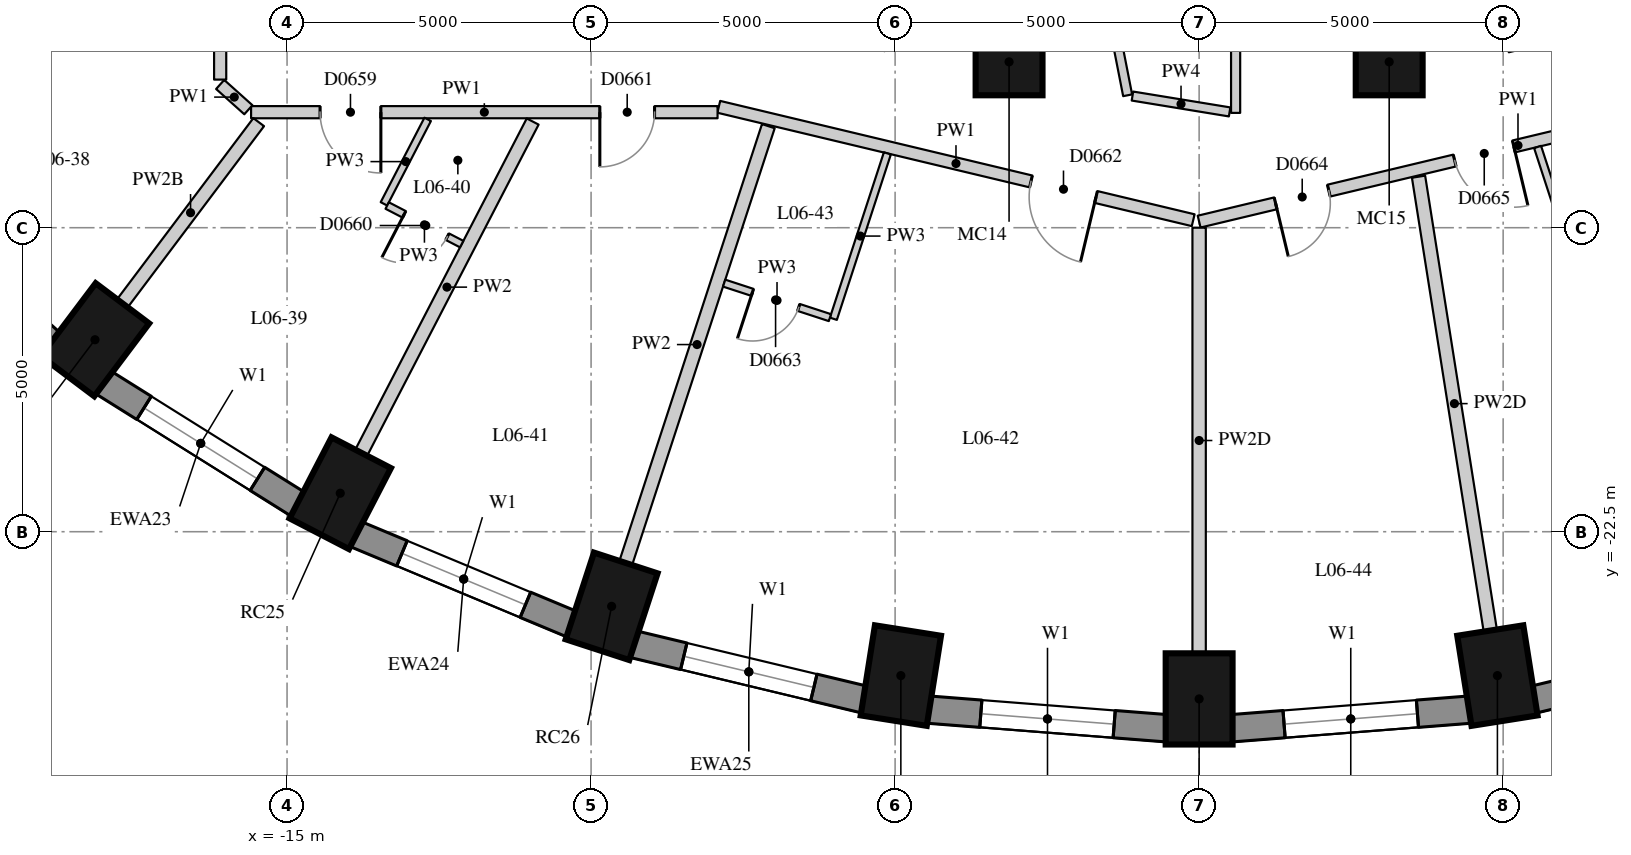
"""IFC4 building model, lengths in metres.
Left out: names, types, materials, properties, quantities, classifications, styles, units other than length and angle.
Written with IfcOpenShell. Run it as: python <this file> out.ifc"""

import sys

from ifc_helpers import new_model, si_unit, direction, frame, frame_2d, origin, origin_2d, place, context, subcontext, project, spatial, rectangle, extrude, element, fill, save


model = new_model("IFC4")
c1 = context("Model", 3, precision=1e-05, world=origin(), true_north=direction((0.0, 1.0)))
c2 = subcontext(c1, "Body", "Model", "MODEL_VIEW")
j1 = project(units=[si_unit("LENGTHUNIT", "METRE"), si_unit("PLANEANGLEUNIT", "RADIAN")], contexts=[c1])
p1 = place(None, origin())
s1 = spatial("IfcSite", under=j1, at=p1, CompositionType="ELEMENT")
p2 = place(p1, origin())
s2 = spatial("IfcBuilding", under=s1, at=p2, CompositionType="ELEMENT")
p3 = place(p2, frame((0.0, 0.0, 28.3)))
s3 = spatial("IfcBuildingStorey", under=s2, at=p3, CompositionType="ELEMENT", Elevation=28.3)
for number, where, z_axis, x_axis in (
    (1, (-18.159, -19.343, 0.0), (0.0, 0.0, 1.0), (-0.601, -0.799, 0.0)),
    (2, (-14.125, -21.867, 0.0), (0.0, 0.0, 1.0), (-0.46, -0.888, 0.0)),
    (3, (-9.662, -23.727, 0.0), (0.0, 0.0, 1.0), (-0.31, -0.951, 0.0)),
    (4, (-4.906, -24.866, 0.0), (0.0, 0.0, 1.0), (-0.156, -0.988, 0.0)),
    (5, (0.0, -25.25, 0.0), (0.0, 0.0, 1.0), (0.0, -1.0, 0.0)),
    (6, (4.906, -24.866, 0.0), (0.0, 0.0, 1.0), (0.156, -0.988, 0.0)),
):
    element("IfcColumn", number, at=place(p3, frame(where, z_axis=z_axis, x_axis=x_axis)), inside=s3, PredefinedType="COLUMN", context=c2, shape_type="SweptSolid", body=[
        extrude(rectangle(XDim=1.5, YDim=1.1, at=origin_2d()), origin(), (0.0, 0.0, 1.0), 3.3),
    ])
for number, where, z_axis, x_axis in (
    (7, (-3.126, -14.772, 0.0), (0.0, 0.0, 1.0), (1.0, 0.0, 0.0)),
    (8, (3.126, -14.772, 0.0), (0.0, 0.0, 1.0), (1.0, 0.0, 0.0)),
):
    element("IfcColumn", number, at=place(p3, frame(where, z_axis=z_axis, x_axis=x_axis)), inside=s3, PredefinedType="COLUMN", context=c2, shape_type="SweptSolid", body=[
        extrude(rectangle(XDim=1.1, YDim=1.1, at=origin_2d()), origin(), (0.0, 0.0, 1.0), 3.3),
    ])
p4 = place(p3, frame((-21.627, -16.943, 0.0), z_axis=(0.0, 0.0, 1.0), x_axis=(0.745526233716, -0.66647628228, 0.0)))
e9 = element("IfcWall", 9, at=p4, inside=s3, PredefinedType="SOLIDWALL", context=c2, shape_type="SweptSolid", body=[
    extrude(rectangle(XDim=3.697, YDim=0.45, at=frame_2d((1.848, 0.0))), origin(), (0.0, 0.0, 1.0), 3.02),
])
p5 = place(p4, frame((0.749, 0.0, 0.4)))
e10 = element("IfcOpeningElement", 10, at=p5, cuts=e9, PredefinedType="OPENING", context=c2, shape_type="SweptSolid", body=[
    extrude(rectangle(XDim=2.2, YDim=1.75, at=frame_2d((1.1, 0.875))), frame((0.0, 0.235, 0.0), z_axis=(0.0, -1.0, 0.0), x_axis=(1.0, 0.0, 0.0)), (0.0, 0.0, 1.0), 0.47),
])
p6 = place(p3, frame((-18.023, -20.044, 0.0), z_axis=(0.0, 0.0, 1.0), x_axis=(0.847635480093, -0.530579016629, 0.0)))
e11 = element("IfcWall", 11, at=p6, inside=s3, PredefinedType="SOLIDWALL", context=c2, shape_type="SweptSolid", body=[
    extrude(rectangle(XDim=3.782, YDim=0.45, at=frame_2d((1.891, 0.0))), origin(), (0.0, 0.0, 1.0), 3.02),
])
p7 = place(p6, frame((0.791, 0.0, 0.4)))
e12 = element("IfcOpeningElement", 12, at=p7, cuts=e11, PredefinedType="OPENING", context=c2, shape_type="SweptSolid", body=[
    extrude(rectangle(XDim=2.2, YDim=1.75, at=frame_2d((1.1, 0.875))), frame((0.0, 0.235, 0.0), z_axis=(0.0, -1.0, 0.0), x_axis=(1.0, 0.0, 0.0)), (0.0, 0.0, 1.0), 0.47),
])
p8 = place(p3, frame((-13.875, -22.537, 0.0), z_axis=(0.0, 0.0, 1.0), x_axis=(0.923031964282, -0.384723267966, 0.0)))
e13 = element("IfcWall", 13, at=p8, inside=s3, PredefinedType="SOLIDWALL", context=c2, shape_type="SweptSolid", body=[
    extrude(rectangle(XDim=3.856, YDim=0.45, at=frame_2d((1.928, 0.0))), origin(), (0.0, 0.0, 1.0), 3.02),
])
p9 = place(p8, frame((0.828, 0.0, 0.4)))
e14 = element("IfcOpeningElement", 14, at=p9, cuts=e13, PredefinedType="OPENING", context=c2, shape_type="SweptSolid", body=[
    extrude(rectangle(XDim=2.2, YDim=1.75, at=frame_2d((1.1, 0.875))), frame((0.0, 0.235, 0.0), z_axis=(0.0, -1.0, 0.0), x_axis=(1.0, 0.0, 0.0)), (0.0, 0.0, 1.0), 0.47),
])
p10 = place(p3, frame((-9.308, -24.35, 0.0), z_axis=(0.0, 0.0, 1.0), x_axis=(0.972496561493, -0.232917233979, 0.0)))
e15 = element("IfcWall", 15, at=p10, inside=s3, PredefinedType="SOLIDWALL", context=c2, shape_type="SweptSolid", body=[
    extrude(rectangle(XDim=3.911, YDim=0.45, at=frame_2d((1.956, 0.0))), origin(), (0.0, 0.0, 1.0), 3.02),
])
p11 = place(p10, frame((0.855, 0.0, 0.4)))
e16 = element("IfcOpeningElement", 16, at=p11, cuts=e15, PredefinedType="OPENING", context=c2, shape_type="SweptSolid", body=[
    extrude(rectangle(XDim=2.2, YDim=1.75, at=frame_2d((1.1, 0.875))), frame((0.0, 0.235, 0.0), z_axis=(0.0, -1.0, 0.0), x_axis=(1.0, 0.0, 0.0)), (0.0, 0.0, 1.0), 0.47),
])
p12 = place(p3, frame((-4.457, -25.426, 0.0), z_axis=(0.0, 0.0, 1.0), x_axis=(0.996955972145, -0.077966592873, 0.0)))
e17 = element("IfcWall", 17, at=p12, inside=s3, PredefinedType="SOLIDWALL", context=c2, shape_type="SweptSolid", body=[
    extrude(rectangle(XDim=3.939, YDim=0.45, at=frame_2d((1.97, 0.0))), origin(), (0.0, 0.0, 1.0), 3.02),
])
p13 = place(p12, frame((0.87, 0.0, 0.4)))
e18 = element("IfcOpeningElement", 18, at=p13, cuts=e17, PredefinedType="OPENING", context=c2, shape_type="SweptSolid", body=[
    extrude(rectangle(XDim=2.2, YDim=1.75, at=frame_2d((1.1, 0.875))), frame((0.0, 0.235, 0.0), z_axis=(0.0, -1.0, 0.0), x_axis=(1.0, 0.0, 0.0)), (0.0, 0.0, 1.0), 0.47),
])
p14 = place(p3, frame((0.53, -25.733, 0.0), z_axis=(0.0, 0.0, 1.0), x_axis=(0.996955972145, 0.077966592873, 0.0)))
e19 = element("IfcWall", 19, at=p14, inside=s3, PredefinedType="SOLIDWALL", context=c2, shape_type="SweptSolid", body=[
    extrude(rectangle(XDim=3.939, YDim=0.45, at=frame_2d((1.97, 0.0))), origin(), (0.0, 0.0, 1.0), 3.02),
])
p15 = place(p14, frame((0.87, 0.0, 0.4)))
e20 = element("IfcOpeningElement", 20, at=p15, cuts=e19, PredefinedType="OPENING", context=c2, shape_type="SweptSolid", body=[
    extrude(rectangle(XDim=2.2, YDim=1.75, at=frame_2d((1.1, 0.875))), frame((0.0, 0.235, 0.0), z_axis=(0.0, -1.0, 0.0), x_axis=(1.0, 0.0, 0.0)), (0.0, 0.0, 1.0), 0.47),
])
p16 = place(p3, frame((5.504, -25.26, 0.0), z_axis=(0.0, 0.0, 1.0), x_axis=(0.972496561493, 0.232917233979, 0.0)))
e21 = element("IfcWall", 21, at=p16, inside=s3, PredefinedType="SOLIDWALL", context=c2, shape_type="SweptSolid", body=[
    extrude(rectangle(XDim=3.911, YDim=0.45, at=frame_2d((1.956, 0.0))), origin(), (0.0, 0.0, 1.0), 3.02),
])
p17 = place(p16, frame((0.855, 0.0, 0.4)))
e22 = element("IfcOpeningElement", 22, at=p17, cuts=e21, PredefinedType="OPENING", context=c2, shape_type="SweptSolid", body=[
    extrude(rectangle(XDim=2.2, YDim=1.75, at=frame_2d((1.1, 0.875))), frame((0.0, 0.235, 0.0), z_axis=(0.0, -1.0, 0.0), x_axis=(1.0, 0.0, 0.0)), (0.0, 0.0, 1.0), 0.47),
])
p18 = place(p3, frame((10.488, -14.893, 0.0), z_axis=(0.0, 0.0, 1.0), x_axis=(-0.972603489924, -0.23247032367, 0.0)))
e23 = element("IfcWall", 23, at=p18, inside=s3, PredefinedType="PARTITIONING", context=c2, shape_type="SweptSolid", body=[
    extrude(rectangle(XDim=10.783, YDim=0.2, at=frame_2d((5.392, 0.0))), origin(), (0.0, 0.0, 1.0), 3.02),
])
p19 = place(p18, frame((8.59, 0.0, 0.0)))
e24 = element("IfcOpeningElement", 24, at=p19, cuts=e23, PredefinedType="OPENING", context=c2, shape_type="SweptSolid", body=[
    extrude(rectangle(XDim=0.9, YDim=2.1, at=frame_2d((0.45, 1.05))), frame((0.0, 0.11, 0.0), z_axis=(0.0, -1.0, 0.0), x_axis=(1.0, 0.0, 0.0)), (0.0, 0.0, 1.0), 0.22),
])
p20 = place(p18, frame((5.462, 0.0, 0.0)))
e25 = element("IfcOpeningElement", 25, at=p20, cuts=e23, PredefinedType="OPENING", context=c2, shape_type="SweptSolid", body=[
    extrude(rectangle(XDim=1.0, YDim=2.1, at=frame_2d((0.5, 1.05))), frame((0.0, 0.11, 0.0), z_axis=(0.0, -1.0, 0.0), x_axis=(1.0, 0.0, 0.0)), (0.0, 0.0, 1.0), 0.22),
])
p21 = place(p3, frame((-0.098, -17.377, 0.0), z_axis=(0.0, 0.0, 1.0), x_axis=(-0.97260043732, 0.232483094708, 0.0)))
e26 = element("IfcWall", 26, at=p21, inside=s3, PredefinedType="PARTITIONING", context=c2, shape_type="SweptSolid", body=[
    extrude(rectangle(XDim=8.022, YDim=0.2, at=frame_2d((4.011, 0.0))), origin(), (0.0, 0.0, 1.0), 3.02),
])
p22 = place(p21, frame((1.643, 0.0, 0.0)))
e27 = element("IfcOpeningElement", 27, at=p22, cuts=e26, PredefinedType="OPENING", context=c2, shape_type="SweptSolid", body=[
    extrude(rectangle(XDim=1.1, YDim=2.1, at=frame_2d((0.55, 1.05))), frame((0.0, 0.11, 0.0), z_axis=(0.0, -1.0, 0.0), x_axis=(1.0, 0.0, 0.0)), (0.0, 0.0, 1.0), 0.22),
])
p23 = place(p3, frame((-7.92, -15.6, 0.0), z_axis=(0.0, 0.0, 1.0), x_axis=(-1.0, 0.0, 0.0)))
e28 = element("IfcWall", 28, at=p23, inside=s3, PredefinedType="PARTITIONING", context=c2, shape_type="SweptSolid", body=[
    extrude(rectangle(XDim=7.672, YDim=0.2, at=frame_2d((3.836, 0.0))), origin(), (0.0, 0.0, 1.0), 3.02),
])
p24 = place(p23, frame((5.537, 0.0, 0.0)))
e29 = element("IfcOpeningElement", 29, at=p24, cuts=e28, PredefinedType="OPENING", context=c2, shape_type="SweptSolid", body=[
    extrude(rectangle(XDim=1.0, YDim=2.1, at=frame_2d((0.5, 1.05))), frame((0.0, 0.11, 0.0), z_axis=(0.0, -1.0, 0.0), x_axis=(1.0, 0.0, 0.0)), (0.0, 0.0, 1.0), 0.22),
])
p25 = place(p23, frame((1.036, 0.0, 0.0)))
e30 = element("IfcOpeningElement", 30, at=p25, cuts=e28, PredefinedType="OPENING", context=c2, shape_type="SweptSolid", body=[
    extrude(rectangle(XDim=0.9, YDim=2.1, at=frame_2d((0.45, 1.05))), frame((0.0, 0.11, 0.0), z_axis=(0.0, -1.0, 0.0), x_axis=(1.0, 0.0, 0.0)), (0.0, 0.0, 1.0), 0.22),
])
p26 = place(p3, frame((-15.636, -15.56, 0.0), z_axis=(0.0, 0.0, 1.0), x_axis=(-0.744656758283, 0.667447610187, 0.0)))
e31 = element("IfcWall", 31, at=p26, inside=s3, PredefinedType="PARTITIONING", context=c2, shape_type="SweptSolid", body=[
    extrude(rectangle(XDim=0.623, YDim=0.2, at=frame_2d((0.312, 0.0))), origin(), (0.0, 0.0, 1.0), 3.02),
])
p27 = place(p3, frame((-16.1, -15.064, 0.0), z_axis=(0.0, 0.0, 1.0), x_axis=(0.0, 1.0, 0.0)))
e32 = element("IfcWall", 32, at=p27, inside=s3, PredefinedType="PARTITIONING", context=c2, shape_type="SweptSolid", body=[
    extrude(rectangle(XDim=6.047, YDim=0.2, at=frame_2d((3.023, 0.0))), origin(), (0.0, 0.0, 1.0), 3.02),
])
p28 = place(p27, frame((4.727, 0.0, 0.0)))
e33 = element("IfcOpeningElement", 33, at=p28, cuts=e32, PredefinedType="OPENING", context=c2, shape_type="SweptSolid", body=[
    extrude(rectangle(XDim=1.1, YDim=2.1, at=frame_2d((0.55, 1.05))), frame((0.0, 0.11, 0.0), z_axis=(0.0, -1.0, 0.0), x_axis=(1.0, 0.0, 0.0)), (0.0, 0.0, 1.0), 0.22),
])
p29 = place(p27, frame((1.467, 0.0, 0.0)))
e34 = element("IfcOpeningElement", 34, at=p29, cuts=e32, PredefinedType="OPENING", context=c2, shape_type="SweptSolid", body=[
    extrude(rectangle(XDim=1.1, YDim=2.1, at=frame_2d((0.55, 1.05))), frame((0.0, 0.11, 0.0), z_axis=(0.0, -1.0, 0.0), x_axis=(1.0, 0.0, 0.0)), (0.0, 0.0, 1.0), 0.22),
])
p30 = place(p3, frame((-1.176, -15.322, 0.0), z_axis=(0.0, 0.0, 1.0), x_axis=(-0.192477233237, 0.981301439256, 0.0)))
e35 = element("IfcWall", 35, at=p30, inside=s3, PredefinedType="PARTITIONING", context=c2, shape_type="SweptSolid", body=[
    extrude(rectangle(XDim=2.13, YDim=0.15, at=frame_2d((1.065, 0.0))), origin(), (0.0, 0.0, 1.0), 3.02),
])
p31 = place(p3, frame((0.6, -9.23, 0.0), z_axis=(0.0, 0.0, 1.0), x_axis=(0.0, -1.0, 0.0)))
e36 = element("IfcWall", 36, at=p31, inside=s3, PredefinedType="PARTITIONING", context=c2, shape_type="SweptSolid", body=[
    extrude(rectangle(XDim=6.382, YDim=0.15, at=frame_2d((3.191, 0.0))), origin(), (0.0, 0.0, 1.0), 2.47),
])
p32 = place(p3, frame((0.501, -15.596, 0.0), z_axis=(0.0, 0.0, 1.0), x_axis=(-0.986922601781, 0.161194845119, 0.0)))
e37 = element("IfcWall", 37, at=p32, inside=s3, PredefinedType="PARTITIONING", context=c2, shape_type="SweptSolid", body=[
    extrude(rectangle(XDim=1.619, YDim=0.15, at=frame_2d((0.81, 0.0))), origin(), (0.0, 0.0, 1.0), 3.02),
])
p33 = place(p3, frame((9.673, -13.443, 0.0), z_axis=(0.0, 0.0, 1.0), x_axis=(-0.972603013932, -0.232472315103, 0.0)))
e38 = element("IfcWall", 38, at=p33, inside=s3, PredefinedType="PARTITIONING", context=c2, shape_type="SweptSolid", body=[
    extrude(rectangle(XDim=4.727, YDim=0.15, at=frame_2d((2.363, 0.0))), origin(), (0.0, 0.0, 1.0), 3.02),
])
p34 = place(p33, frame((1.914, 0.0, 0.0)))
e39 = element("IfcOpeningElement", 39, at=p34, cuts=e38, PredefinedType="OPENING", context=c2, shape_type="SweptSolid", body=[
    extrude(rectangle(XDim=0.9, YDim=2.1, at=frame_2d((0.45, 1.05))), frame((0.0, 0.085, 0.0), z_axis=(0.0, -1.0, 0.0), x_axis=(1.0, 0.0, 0.0)), (0.0, 0.0, 1.0), 0.17),
])
p35 = place(p3, frame((-21.093, -15.718, 0.0), z_axis=(0.0, 0.0, 1.0), x_axis=(0.73009284205, 0.683347965525, 0.0)))
e40 = element("IfcWall", 40, at=p35, inside=s3, PredefinedType="PARTITIONING", context=c2, shape_type="SweptSolid", body=[
    extrude(rectangle(XDim=6.602, YDim=0.22, at=frame_2d((3.301, 0.0))), origin(), (0.0, 0.0, 1.0), 3.02),
])
p36 = place(p3, frame((-17.708, -18.743, 0.0), z_axis=(0.0, 0.0, 1.0), x_axis=(0.601172757903, 0.799119086967, 0.0)))
e41 = element("IfcWall", 41, at=p36, inside=s3, PredefinedType="PARTITIONING", context=c2, shape_type="SweptSolid", body=[
    extrude(rectangle(XDim=3.729, YDim=0.22, at=frame_2d((1.864, 0.0))), origin(), (0.0, 0.0, 1.0), 2.57),
])
p37 = place(p3, frame((-13.78, -21.201, 0.0), z_axis=(0.0, 0.0, 1.0), x_axis=(0.459699000582, 0.888074787878, 0.0)))
e42 = element("IfcWall", 42, at=p37, inside=s3, PredefinedType="PARTITIONING", context=c2, shape_type="SweptSolid", body=[
    extrude(rectangle(XDim=6.134, YDim=0.22, at=frame_2d((3.067, 0.0))), origin(), (0.0, 0.0, 1.0), 3.02),
])
p38 = place(p3, frame((-9.429, -23.014, 0.0), z_axis=(0.0, 0.0, 1.0), x_axis=(0.310261176215, 0.950651356983, 0.0)))
e43 = element("IfcWall", 43, at=p38, inside=s3, PredefinedType="PARTITIONING", context=c2, shape_type="SweptSolid", body=[
    extrude(rectangle(XDim=7.557, YDim=0.22, at=frame_2d((3.779, 0.0))), origin(), (0.0, 0.0, 1.0), 3.02),
])
p39 = place(p3, frame((0.0, -24.5, 0.0), z_axis=(0.0, 0.0, 1.0), x_axis=(0.0, 1.0, 0.0)))
e44 = element("IfcWall", 44, at=p39, inside=s3, PredefinedType="PARTITIONING", context=c2, shape_type="SweptSolid", body=[
    extrude(rectangle(XDim=7.0, YDim=0.22, at=frame_2d((3.5, 0.0))), origin(), (0.0, 0.0, 1.0), 2.47),
])
p40 = place(p3, frame((4.788, -24.125, 0.0), z_axis=(0.0, 0.0, 1.0), x_axis=(-0.156131781396, 0.987736233434, 0.0)))
e45 = element("IfcWall", 45, at=p40, inside=s3, PredefinedType="PARTITIONING", context=c2, shape_type="SweptSolid", body=[
    extrude(rectangle(XDim=7.557, YDim=0.22, at=frame_2d((3.779, 0.0))), origin(), (0.0, 0.0, 1.0), 2.47),
])
p41 = place(p3, frame((-12.687, -15.718, 0.0), z_axis=(0.0, 0.0, 1.0), x_axis=(-0.459775159711, -0.888035361071, 0.0)))
e46 = element("IfcWall", 46, at=p41, inside=s3, PredefinedType="PARTITIONING", context=c2, shape_type="SweptSolid", body=[
    extrude(rectangle(XDim=1.565, YDim=0.12, at=frame_2d((0.782, 0.0))), origin(), (0.0, 0.0, 1.0), 3.02),
])
p42 = place(p3, frame((-5.127, -16.277, 0.0), z_axis=(0.0, 0.0, 1.0), x_axis=(-0.310206676877, -0.950669142037, 0.0)))
e47 = element("IfcWall", 47, at=p42, inside=s3, PredefinedType="PARTITIONING", context=c2, shape_type="SweptSolid", body=[
    extrude(rectangle(XDim=2.862, YDim=0.12, at=frame_2d((1.431, 0.0))), origin(), (0.0, 0.0, 1.0), 3.02),
])
p43 = place(p3, frame((5.566, -16.172, 0.0), z_axis=(0.0, 0.0, 1.0), x_axis=(0.310159281599, -0.950684605975, 0.0)))
e48 = element("IfcWall", 48, at=p43, inside=s3, PredefinedType="PARTITIONING", context=c2, shape_type="SweptSolid", body=[
    extrude(rectangle(XDim=2.525, YDim=0.12, at=frame_2d((1.263, 0.0))), origin(), (0.0, 0.0, 1.0), 3.02),
])
p44 = place(p3, frame((-13.353, -17.135, 0.0), z_axis=(0.0, 0.0, 1.0), x_axis=(0.888075681402, -0.459697274413, 0.0)))
e49 = element("IfcWall", 49, at=p44, inside=s3, PredefinedType="PARTITIONING", context=c2, shape_type="SweptSolid", body=[
    extrude(rectangle(XDim=1.38, YDim=0.12, at=frame_2d((0.69, 0.0))), origin(), (0.0, 0.0, 1.0), 3.02),
])
p45 = place(p44, frame((0.315, 0.0, 0.0)))
e50 = element("IfcOpeningElement", 50, at=p45, cuts=e49, PredefinedType="OPENING", context=c2, shape_type="SweptSolid", body=[
    extrude(rectangle(XDim=0.8, YDim=2.1, at=frame_2d((0.4, 1.05))), frame((0.0, 0.07, 0.0), z_axis=(0.0, -1.0, 0.0), x_axis=(1.0, 0.0, 0.0)), (0.0, 0.0, 1.0), 0.14),
])
p46 = place(p3, frame((-6.072, -18.979, 0.0), z_axis=(0.0, 0.0, 1.0), x_axis=(-0.950678536911, 0.31017788357, 0.0)))
e51 = element("IfcWall", 51, at=p46, inside=s3, PredefinedType="PARTITIONING", context=c2, shape_type="SweptSolid", body=[
    extrude(rectangle(XDim=1.83, YDim=0.12, at=frame_2d((0.915, 0.0))), origin(), (0.0, 0.0, 1.0), 3.02),
])
p47 = place(p46, frame((0.54, 0.0, 0.0)))
e52 = element("IfcOpeningElement", 52, at=p47, cuts=e51, PredefinedType="OPENING", context=c2, shape_type="SweptSolid", body=[
    extrude(rectangle(XDim=0.8, YDim=2.1, at=frame_2d((0.4, 1.05))), frame((0.0, 0.07, 0.0), z_axis=(0.0, -1.0, 0.0), x_axis=(1.0, 0.0, 0.0)), (0.0, 0.0, 1.0), 0.14),
])
p48 = place(p7, origin())
e53 = element("IfcWindow", 53, at=p48, inside=s3, PartitioningType="SINGLE_PANEL", PredefinedType="WINDOW", context=c2, shape_type="SweptSolid", body=[
    extrude(rectangle(XDim=2.2, YDim=1.75, at=frame_2d((1.1, 0.875))), frame((0.0, 0.035, 0.0), z_axis=(0.0, -1.0, 0.0), x_axis=(1.0, 0.0, 0.0)), (0.0, 0.0, 1.0), 0.06),
])
fill(e12, e53)
p49 = place(p9, origin())
e54 = element("IfcWindow", 54, at=p49, inside=s3, PartitioningType="SINGLE_PANEL", PredefinedType="WINDOW", context=c2, shape_type="SweptSolid", body=[
    extrude(rectangle(XDim=2.2, YDim=1.75, at=frame_2d((1.1, 0.875))), frame((0.0, 0.035, 0.0), z_axis=(0.0, -1.0, 0.0), x_axis=(1.0, 0.0, 0.0)), (0.0, 0.0, 1.0), 0.06),
])
fill(e14, e54)
p50 = place(p11, origin())
e55 = element("IfcWindow", 55, at=p50, inside=s3, PartitioningType="SINGLE_PANEL", PredefinedType="WINDOW", context=c2, shape_type="SweptSolid", body=[
    extrude(rectangle(XDim=2.2, YDim=1.75, at=frame_2d((1.1, 0.875))), frame((0.0, 0.035, 0.0), z_axis=(0.0, -1.0, 0.0), x_axis=(1.0, 0.0, 0.0)), (0.0, 0.0, 1.0), 0.06),
])
fill(e16, e55)
p51 = place(p13, origin())
e56 = element("IfcWindow", 56, at=p51, inside=s3, PartitioningType="SINGLE_PANEL", PredefinedType="WINDOW", context=c2, shape_type="SweptSolid", body=[
    extrude(rectangle(XDim=2.2, YDim=1.75, at=frame_2d((1.1, 0.875))), frame((0.0, 0.035, 0.0), z_axis=(0.0, -1.0, 0.0), x_axis=(1.0, 0.0, 0.0)), (0.0, 0.0, 1.0), 0.06),
])
fill(e18, e56)
p52 = place(p15, origin())
e57 = element("IfcWindow", 57, at=p52, inside=s3, PartitioningType="SINGLE_PANEL", PredefinedType="WINDOW", context=c2, shape_type="SweptSolid", body=[
    extrude(rectangle(XDim=2.2, YDim=1.75, at=frame_2d((1.1, 0.875))), frame((0.0, 0.035, 0.0), z_axis=(0.0, -1.0, 0.0), x_axis=(1.0, 0.0, 0.0)), (0.0, 0.0, 1.0), 0.06),
])
fill(e20, e57)
p53 = place(p24, origin())
e58 = element("IfcDoor", 58, at=p53, inside=s3, OperationType="SINGLE_SWING_LEFT", PredefinedType="DOOR", context=c2, shape_type="SweptSolid", body=[
    extrude(rectangle(XDim=1.0, YDim=2.1, at=frame_2d((0.5, 1.05))), frame((0.0, 0.025, 0.0), z_axis=(0.0, -1.0, 0.0), x_axis=(1.0, 0.0, 0.0)), (0.0, 0.0, 1.0), 0.05),
])
fill(e29, e58)
p54 = place(p45, origin())
e59 = element("IfcDoor", 59, at=p54, inside=s3, OperationType="SINGLE_SWING_RIGHT", PredefinedType="DOOR", context=c2, shape_type="SweptSolid", body=[
    extrude(rectangle(XDim=0.8, YDim=2.1, at=frame_2d((0.4, 1.05))), frame((0.0, 0.025, 0.0), z_axis=(0.0, -1.0, 0.0), x_axis=(1.0, 0.0, 0.0)), (0.0, 0.0, 1.0), 0.05),
])
fill(e50, e59)
p55 = place(p25, origin())
e60 = element("IfcDoor", 60, at=p55, inside=s3, OperationType="SINGLE_SWING_RIGHT", PredefinedType="DOOR", context=c2, shape_type="SweptSolid", body=[
    extrude(rectangle(XDim=0.9, YDim=2.1, at=frame_2d((0.45, 1.05))), frame((0.0, 0.025, 0.0), z_axis=(0.0, -1.0, 0.0), x_axis=(1.0, 0.0, 0.0)), (0.0, 0.0, 1.0), 0.05),
])
fill(e30, e60)
p56 = place(p22, origin())
e61 = element("IfcDoor", 61, at=p56, inside=s3, OperationType="SINGLE_SWING_LEFT", PredefinedType="DOOR", context=c2, shape_type="SweptSolid", body=[
    extrude(rectangle(XDim=1.1, YDim=2.1, at=frame_2d((0.55, 1.05))), frame((0.0, 0.025, 0.0), z_axis=(0.0, -1.0, 0.0), x_axis=(1.0, 0.0, 0.0)), (0.0, 0.0, 1.0), 0.05),
])
fill(e27, e61)
p57 = place(p47, origin())
e62 = element("IfcDoor", 62, at=p57, inside=s3, OperationType="SINGLE_SWING_RIGHT", PredefinedType="DOOR", context=c2, shape_type="SweptSolid", body=[
    extrude(rectangle(XDim=0.8, YDim=2.1, at=frame_2d((0.4, 1.05))), frame((0.0, 0.025, 0.0), z_axis=(0.0, -1.0, 0.0), x_axis=(1.0, 0.0, 0.0)), (0.0, 0.0, 1.0), 0.05),
])
fill(e52, e62)
p58 = place(p19, origin())
e63 = element("IfcDoor", 63, at=p58, inside=s3, OperationType="SINGLE_SWING_RIGHT", PredefinedType="DOOR", context=c2, shape_type="SweptSolid", body=[
    extrude(rectangle(XDim=0.9, YDim=2.1, at=frame_2d((0.45, 1.05))), frame((0.0, 0.025, 0.0), z_axis=(0.0, -1.0, 0.0), x_axis=(1.0, 0.0, 0.0)), (0.0, 0.0, 1.0), 0.05),
])
fill(e24, e63)
p59 = place(p20, origin())
e64 = element("IfcDoor", 64, at=p59, inside=s3, OperationType="SINGLE_SWING_LEFT", PredefinedType="DOOR", context=c2, shape_type="SweptSolid", body=[
    extrude(rectangle(XDim=1.0, YDim=2.1, at=frame_2d((0.5, 1.05))), frame((0.0, 0.025, 0.0), z_axis=(0.0, -1.0, 0.0), x_axis=(1.0, 0.0, 0.0)), (0.0, 0.0, 1.0), 0.05),
])
fill(e25, e64)
save(model, sys.argv[1])
